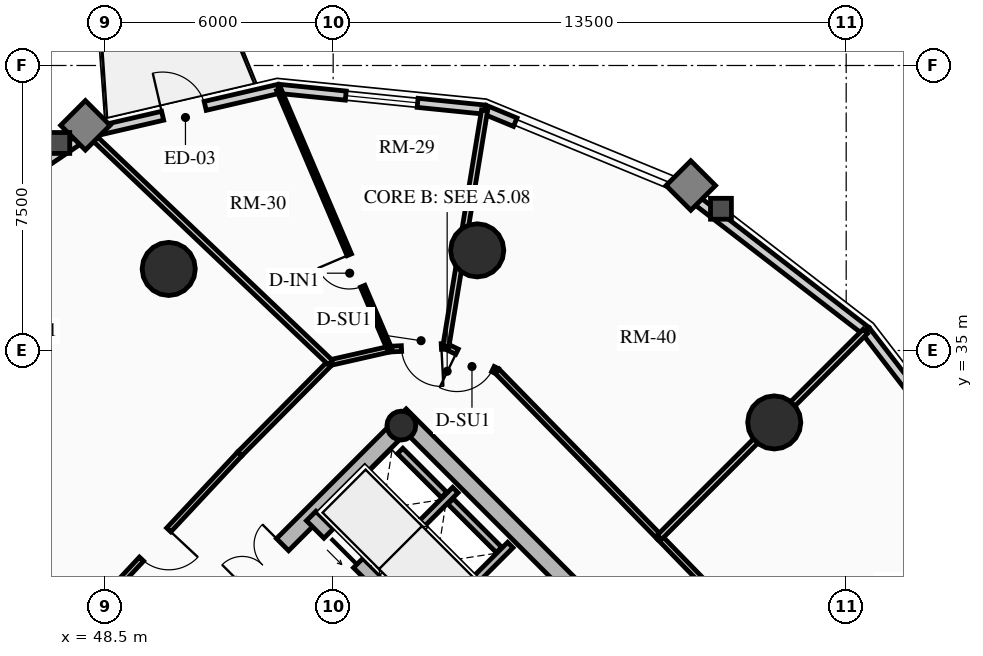
"""IFC4 building model, lengths in metres.
Left out: names, types, materials, properties, quantities, classifications, styles, units other than length and angle.
Written with IfcOpenShell. Run it as: python <this file> out.ifc"""

import sys

from ifc_helpers import new_model, si_unit, direction, frame, frame_2d, origin, origin_2d, place, context, subcontext, project, spatial, rectangle, circle, hollow_circle, extrude, source, transform, mapped, element, fill, save


model = new_model("IFC4")
c1 = context("Model", 3, precision=1e-05, world=origin(), true_north=direction((0.0, 1.0)))
c2 = subcontext(c1, "Body", "Model", "MODEL_VIEW")
j1 = project(units=[si_unit("LENGTHUNIT", "METRE"), si_unit("PLANEANGLEUNIT", "RADIAN")], contexts=[c1])
p1 = place(None, origin())
s1 = spatial("IfcSite", under=j1, at=p1, CompositionType="ELEMENT")
p2 = place(p1, origin())
s2 = spatial("IfcBuilding", under=s1, at=p2, CompositionType="ELEMENT")
p3 = place(p2, frame((0.0, 0.0, 84.7)))
s3 = spatial("IfcBuildingStorey", under=s2, at=p3, CompositionType="ELEMENT", Elevation=84.7)
p4 = place(p3, frame((66.303, 23.263, 0.0), z_axis=(0.0, 0.0, 1.0), x_axis=(-0.707106781187, 0.707106781187, 0.0)))
e1 = element("IfcWall", 1, at=p4, inside=s3, PredefinedType="SHEAR", context=c2, shape_type="SweptSolid", body=[
    extrude(rectangle(XDim=14.2, YDim=0.45, at=frame_2d((7.1, 0.0))), origin(), (0.0, 0.0, 1.0), 2.91),
])
p5 = place(p3, frame((48.856, 25.578, 0.0), z_axis=(0.0, 0.0, 1.0), x_axis=(0.707106781187, 0.707106781187, 0.0)))
e2 = element("IfcWall", 2, at=p5, inside=s3, PredefinedType="SHEAR", context=c2, shape_type="SweptSolid", body=[
    extrude(rectangle(XDim=10.7, YDim=0.45, at=frame_2d((5.35, 0.0))), origin(), (0.0, 0.0, 1.0), 2.91),
])
m1 = source(origin(), c2, "Body", "SweptSolid", [
    extrude(rectangle(XDim=1.5, YDim=2.02, at=frame_2d((0.75, 1.01))), frame((0.0, 0.235, 0.0), z_axis=(0.0, -1.0, 0.0), x_axis=(1.0, 0.0, 0.0)), (0.0, 0.0, 1.0), 0.47),
])
p6 = place(p5, frame((4.6, 0.0, 0.0)))
e3 = element("IfcOpeningElement", 3, at=p6, cuts=e2, PredefinedType="OPENING", context=c2, shape_type="MappedRepresentation", body=[
    mapped(m1, transform((0.0, 0.0, 0.0), x_axis=(1.0, 0.0, 0.0), y_axis=(0.0, 1.0, 0.0), z_axis=(0.0, 0.0, 1.0), scale=1.0)),
])
p7 = place(p3, frame((63.645, 20.922, 0.0), z_axis=(0.0, 0.0, 1.0), x_axis=(-0.707106781187, 0.707106781187, 0.0)))
e4 = element("IfcWall", 4, at=p7, inside=s3, PredefinedType="SHEAR", context=c2, shape_type="SweptSolid", body=[
    extrude(rectangle(XDim=13.75, YDim=0.35, at=frame_2d((6.875, 0.0))), origin(), (0.0, 0.0, 1.0), 2.91),
])
m2 = source(origin(), c2, "Body", "SweptSolid", [
    extrude(rectangle(XDim=1.1, YDim=2.015, at=frame_2d((0.55, 1.007))), frame((0.0, 0.185, 0.0), z_axis=(0.0, -1.0, 0.0), x_axis=(1.0, 0.0, 0.0)), (0.0, 0.0, 1.0), 0.37),
])
p8 = place(p7, frame((10.0, 0.0, 0.0)))
e5 = element("IfcOpeningElement", 5, at=p8, cuts=e4, PredefinedType="OPENING", context=c2, shape_type="MappedRepresentation", body=[
    mapped(m2, transform((0.0, 0.0, 0.0), x_axis=(1.0, 0.0, 0.0), y_axis=(0.0, 1.0, 0.0), z_axis=(0.0, 0.0, 1.0), scale=1.0)),
])
p9 = place(p7, frame((12.0, 0.0, 0.0)))
e6 = element("IfcOpeningElement", 6, at=p9, cuts=e4, PredefinedType="OPENING", context=c2, shape_type="MappedRepresentation", body=[
    mapped(m2, transform((0.0, 0.0, 0.0), x_axis=(1.0, 0.0, 0.0), y_axis=(0.0, 1.0, 0.0), z_axis=(0.0, 0.0, 1.0), scale=1.0)),
])
m3 = source(origin(), c2, "Body", "SweptSolid", [
    extrude(rectangle(XDim=1.15, YDim=2.02, at=frame_2d((0.575, 1.01))), frame((0.0, 0.185, 0.0), z_axis=(0.0, -1.0, 0.0), x_axis=(1.0, 0.0, 0.0)), (0.0, 0.0, 1.0), 0.37),
])
p10 = place(p7, frame((5.305, 0.0, 0.0)))
e7 = element("IfcOpeningElement", 7, at=p10, cuts=e4, PredefinedType="OPENING", context=c2, shape_type="MappedRepresentation", body=[
    mapped(m3, transform((0.0, 0.0, 0.0), x_axis=(1.0, 0.0, 0.0), y_axis=(0.0, 1.0, 0.0), z_axis=(0.0, 0.0, 1.0), scale=1.0)),
])
p11 = place(p3, frame((56.294, 33.024, 0.0), z_axis=(0.0, 0.0, 1.0), x_axis=(0.707106781187, 0.707106781187, 0.0)))
e8 = element("IfcColumn", 8, at=p11, inside=s3, PredefinedType="COLUMN", context=c2, shape_type="SweptSolid", body=[
    extrude(hollow_circle(Radius=0.38, WallThickness=0.032, at=origin_2d()), origin(), (0.0, 0.0, 1.0), 2.91),
])
for number, where, z_axis, x_axis in (
    (9, (66.107, 33.107, 0.0), (0.0, 0.0, 1.0), (1.0, 0.0, 0.0)),
    (10, (58.291, 37.635, 0.0), (0.0, 0.0, 1.0), (1.0, 0.0, 0.0)),
    (11, (50.173, 37.146, 0.0), (0.0, 0.0, 1.0), (1.0, 0.0, 0.0)),
):
    element("IfcColumn", number, at=place(p3, frame(where, z_axis=z_axis, x_axis=x_axis)), inside=s3, PredefinedType="USERDEFINED", context=c2, shape_type="SweptSolid", body=[
        extrude(circle(Radius=0.7, at=origin_2d()), origin(), (0.0, 0.0, 1.0), 2.91),
    ])
p12 = place(p3, frame((63.811, 39.145, 0.0), z_axis=(0.0, 0.0, 1.0), x_axis=(0.791982052206, -0.61054437102, 0.0)))
e12 = element("IfcWall", 12, at=p12, inside=s3, PredefinedType="SOLIDWALL", context=c2, shape_type="SweptSolid", body=[
    extrude(rectangle(XDim=5.942, YDim=0.24, at=frame_2d((2.971, 0.0))), origin(), (0.0, 0.0, 1.0), 2.179),
])
p13 = place(p3, frame((58.487, 41.339, 0.0), z_axis=(0.0, 0.0, 1.0), x_axis=(0.924556017656, -0.381046152345, 0.0)))
e13 = element("IfcWall", 13, at=p13, inside=s3, PredefinedType="SOLIDWALL", context=c2, shape_type="SweptSolid", body=[
    extrude(rectangle(XDim=0.87, YDim=0.24, at=frame_2d((0.435, 0.0))), origin(), (0.0, 0.0, 1.0), 2.179),
])
p14 = place(p3, frame((53.067, 41.885, 0.0), z_axis=(0.0, 0.0, 1.0), x_axis=(0.994971754311, -0.10015591906, 0.0)))
e14 = element("IfcWall", 14, at=p14, inside=s3, PredefinedType="SOLIDWALL", context=c2, shape_type="SweptSolid", body=[
    extrude(rectangle(XDim=5.448, YDim=0.24, at=frame_2d((2.724, 0.0))), origin(), (0.0, 0.0, 1.0), 2.179),
])
m4 = source(origin(), c2, "Body", "SweptSolid", [
    extrude(rectangle(XDim=1.9, YDim=1.35, at=frame_2d((0.95, 0.675))), frame((0.0, 0.13, 0.0), z_axis=(0.0, -1.0, 0.0), x_axis=(1.0, 0.0, 0.0)), (0.0, 0.0, 1.0), 0.26),
])
p15 = place(p14, frame((1.774, 0.0, 0.65)))
e15 = element("IfcOpeningElement", 15, at=p15, cuts=e14, PredefinedType="OPENING", context=c2, shape_type="MappedRepresentation", body=[
    mapped(m4, transform((0.0, 0.0, 0.0), x_axis=(1.0, 0.0, 0.0), y_axis=(0.0, 1.0, 0.0), z_axis=(0.0, 0.0, 1.0), scale=1.0)),
])
p16 = place(p3, frame((48.08, 40.729, 0.0), z_axis=(0.0, 0.0, 1.0), x_axis=(0.974165631126, 0.225834725257, 0.0)))
e16 = element("IfcWall", 16, at=p16, inside=s3, PredefinedType="SOLIDWALL", context=c2, shape_type="SweptSolid", body=[
    extrude(rectangle(XDim=5.119, YDim=0.24, at=frame_2d((2.56, 0.0))), origin(), (0.0, 0.0, 1.0), 2.179),
])
m5 = source(origin(), c2, "Body", "SweptSolid", [
    extrude(rectangle(XDim=1.15, YDim=2.005, at=frame_2d((0.575, 1.002))), frame((0.0, 0.13, 0.0), z_axis=(0.0, -1.0, 0.0), x_axis=(1.0, 0.0, 0.0)), (0.0, 0.0, 1.0), 0.26),
])
p17 = place(p16, frame((1.984, 0.0, 0.0)))
e17 = element("IfcOpeningElement", 17, at=p17, cuts=e16, PredefinedType="OPENING", context=c2, shape_type="MappedRepresentation", body=[
    mapped(m5, transform((0.0, 0.0, 0.0), x_axis=(1.0, 0.0, 0.0), y_axis=(0.0, 1.0, 0.0), z_axis=(0.0, 0.0, 1.0), scale=1.0)),
])
p18 = place(p3, frame((44.015, 37.985, 0.0), z_axis=(0.0, 0.0, 1.0), x_axis=(0.828781148131, 0.559572880421, 0.0)))
e18 = element("IfcWall", 18, at=p18, inside=s3, PredefinedType="SOLIDWALL", context=c2, shape_type="SweptSolid", body=[
    extrude(rectangle(XDim=4.905, YDim=0.24, at=frame_2d((2.452, 0.0))), origin(), (0.0, 0.0, 1.0), 2.179),
])
p19 = place(p3, frame((68.517, 35.517, 0.0), z_axis=(0.0, 0.0, 1.0), x_axis=(0.61054437102, -0.791982052206, 0.0)))
e19 = element("IfcWall", 19, at=p19, inside=s3, PredefinedType="SOLIDWALL", context=c2, shape_type="SweptSolid", body=[
    extrude(rectangle(XDim=5.942, YDim=0.24, at=frame_2d((2.971, 0.0))), origin(), (0.0, 0.0, 1.0), 2.179),
])
m6 = source(origin(), c2, "Body", "SweptSolid", [
    extrude(rectangle(XDim=2.2, YDim=1.35, at=frame_2d((1.1, 0.675))), frame((0.0, 0.13, 0.0), z_axis=(0.0, -1.0, 0.0), x_axis=(1.0, 0.0, 0.0)), (0.0, 0.0, 1.0), 0.26),
])
p20 = place(p19, frame((1.871, 0.0, 0.65)))
e20 = element("IfcOpeningElement", 20, at=p20, cuts=e19, PredefinedType="OPENING", context=c2, shape_type="MappedRepresentation", body=[
    mapped(m6, transform((0.0, 0.0, 0.0), x_axis=(1.0, 0.0, 0.0), y_axis=(0.0, 1.0, 0.0), z_axis=(0.0, 0.0, 1.0), scale=1.0)),
])
p21 = place(p3, frame((57.062, 27.781, 0.0), z_axis=(0.0, 0.0, 1.0), x_axis=(0.707106781187, 0.707106781187, 0.0)))
e21 = element("IfcWall", 21, at=p21, inside=s3, PredefinedType="SHEAR", context=c2, shape_type="SweptSolid", body=[
    extrude(rectangle(XDim=2.97, YDim=0.2, at=frame_2d((1.485, 0.0))), origin(), (0.0, 0.0, 1.0), 2.91),
])
p22 = place(p3, frame((55.615, 29.227, 0.0), z_axis=(0.0, 0.0, 1.0), x_axis=(0.707147878904, 0.70706568108, 0.0)))
e22 = element("IfcWall", 22, at=p22, inside=s3, PredefinedType="SHEAR", context=c2, shape_type="SweptSolid", body=[
    extrude(rectangle(XDim=2.97, YDim=0.2, at=frame_2d((1.485, 0.0))), origin(), (0.0, 0.0, 1.0), 2.91),
])
p23 = place(p3, frame((58.865, 29.754, 0.0), z_axis=(0.0, 0.0, 1.0), x_axis=(-0.707174411312, 0.707039144592, 0.0)))
e23 = element("IfcWall", 23, at=p23, inside=s3, PredefinedType="SHEAR", context=c2, shape_type="SweptSolid", body=[
    extrude(rectangle(XDim=1.805, YDim=0.2, at=frame_2d((0.902, 0.0))), origin(), (0.0, 0.0, 1.0), 2.91),
])
p24 = place(p3, frame((57.419, 31.2, 0.0), z_axis=(0.0, 0.0, 1.0), x_axis=(-0.707032117043, 0.707181437447, 0.0)))
e24 = element("IfcWall", 24, at=p24, inside=s3, PredefinedType="SHEAR", context=c2, shape_type="SweptSolid", body=[
    extrude(rectangle(XDim=1.635, YDim=0.2, at=frame_2d((0.817, 0.0))), origin(), (0.0, 0.0, 1.0), 2.91),
])
p25 = place(p3, frame((63.086, 30.086, 0.0), z_axis=(0.0, 0.0, 1.0), x_axis=(-0.699075897379, 0.715047473741, 0.0)))
e25 = element("IfcWall", 25, at=p25, inside=s3, PredefinedType="PARTITIONING", context=c2, shape_type="SweptSolid", body=[
    extrude(rectangle(XDim=6.114, YDim=0.15, at=frame_2d((3.057, 0.0))), origin(), (0.0, 0.0, 1.0), 2.225),
])
p26 = place(p3, frame((58.812, 34.458, 0.0), z_axis=(0.0, 0.0, 1.0), x_axis=(-0.899559490277, 0.436798264021, 0.0)))
e26 = element("IfcWall", 26, at=p26, inside=s3, PredefinedType="PARTITIONING", context=c2, shape_type="SweptSolid", body=[
    extrude(rectangle(XDim=1.495, YDim=0.15, at=frame_2d((0.748, 0.0))), origin(), (0.0, 0.0, 1.0), 2.225),
])
m7 = source(origin(), c2, "Body", "SweptSolid", [
    extrude(rectangle(XDim=1.05, YDim=2.015, at=frame_2d((0.525, 1.007))), frame((0.0, 0.085, 0.0), z_axis=(0.0, -1.0, 0.0), x_axis=(1.0, 0.0, 0.0)), (0.0, 0.0, 1.0), 0.17),
])
p27 = place(p26, frame((0.12, 0.0, 0.0)))
e27 = element("IfcOpeningElement", 27, at=p27, cuts=e26, PredefinedType="OPENING", context=c2, shape_type="MappedRepresentation", body=[
    mapped(m7, transform((0.0, 0.0, 0.0), x_axis=(1.0, 0.0, 0.0), y_axis=(0.0, 1.0, 0.0), z_axis=(0.0, 0.0, 1.0), scale=1.0)),
])
p28 = place(p3, frame((57.467, 35.111, 0.0), z_axis=(0.0, 0.0, 1.0), x_axis=(-0.998691757323, -0.051134859488, 0.0)))
e28 = element("IfcWall", 28, at=p28, inside=s3, PredefinedType="PARTITIONING", context=c2, shape_type="SweptSolid", body=[
    extrude(rectangle(XDim=1.485, YDim=0.15, at=frame_2d((0.742, 0.0))), origin(), (0.0, 0.0, 1.0), 2.225),
])
p29 = place(p28, frame((0.12, 0.0, 0.0)))
e29 = element("IfcOpeningElement", 29, at=p29, cuts=e28, PredefinedType="OPENING", context=c2, shape_type="MappedRepresentation", body=[
    mapped(m7, transform((0.0, 0.0, 0.0), x_axis=(1.0, 0.0, 0.0), y_axis=(0.0, 1.0, 0.0), z_axis=(0.0, 0.0, 1.0), scale=1.0)),
])
p30 = place(p3, frame((55.984, 35.035, 0.0), z_axis=(0.0, 0.0, 1.0), x_axis=(-0.975290305708, -0.22092718165, 0.0)))
e30 = element("IfcWall", 30, at=p30, inside=s3, PredefinedType="PARTITIONING", context=c2, shape_type="SweptSolid", body=[
    extrude(rectangle(XDim=1.597, YDim=0.15, at=frame_2d((0.798, 0.0))), origin(), (0.0, 0.0, 1.0), 2.225),
])
p31 = place(p3, frame((54.427, 34.683, 0.0), z_axis=(0.0, 0.0, 1.0), x_axis=(-0.704178989986, -0.710022499687, 0.0)))
e31 = element("IfcWall", 31, at=p31, inside=s3, PredefinedType="PARTITIONING", context=c2, shape_type="SweptSolid", body=[
    extrude(rectangle(XDim=3.384, YDim=0.15, at=frame_2d((1.692, 0.0))), origin(), (0.0, 0.0, 1.0), 2.225),
])
p32 = place(p3, frame((52.043, 32.28, 0.0), z_axis=(0.0, 0.0, 1.0), x_axis=(-0.682606081633, -0.730786519661, 0.0)))
e32 = element("IfcWall", 32, at=p32, inside=s3, PredefinedType="PARTITIONING", context=c2, shape_type="SweptSolid", body=[
    extrude(rectangle(XDim=6.527, YDim=0.15, at=frame_2d((3.263, 0.0))), origin(), (0.0, 0.0, 1.0), 2.225),
])
p33 = place(p32, frame((2.738, 0.0, 0.0)))
e33 = element("IfcOpeningElement", 33, at=p33, cuts=e32, PredefinedType="OPENING", context=c2, shape_type="MappedRepresentation", body=[
    mapped(m7, transform((0.0, 0.0, 0.0), x_axis=(1.0, 0.0, 0.0), y_axis=(0.0, 1.0, 0.0), z_axis=(0.0, 0.0, 1.0), scale=1.0)),
])
p34 = place(p3, frame((67.27, 25.78, 0.0), z_axis=(0.0, 0.0, 1.0), x_axis=(-0.696847842907, 0.717218992942, 0.0)))
e34 = element("IfcWall", 34, at=p34, inside=s3, PredefinedType="PARTITIONING", context=c2, shape_type="SweptSolid", body=[
    extrude(rectangle(XDim=6.004, YDim=0.15, at=frame_2d((3.002, 0.0))), origin(), (0.0, 0.0, 1.0), 2.655),
])
m8 = source(origin(), c2, "Body", "SweptSolid", [
    extrude(rectangle(XDim=1.0, YDim=2.015, at=frame_2d((0.5, 1.007))), frame((0.0, 0.085, 0.0), z_axis=(0.0, -1.0, 0.0), x_axis=(1.0, 0.0, 0.0)), (0.0, 0.0, 1.0), 0.17),
])
p35 = place(p34, frame((2.502, 0.0, 0.0)))
e35 = element("IfcOpeningElement", 35, at=p35, cuts=e34, PredefinedType="OPENING", context=c2, shape_type="MappedRepresentation", body=[
    mapped(m8, transform((0.0, 0.0, 0.0), x_axis=(1.0, 0.0, 0.0), y_axis=(0.0, 1.0, 0.0), z_axis=(0.0, 0.0, 1.0), scale=1.0)),
])
p36 = place(p3, frame((63.086, 30.086, 0.0), z_axis=(0.0, 0.0, 1.0), x_axis=(0.707106781187, 0.707106781187, 0.0)))
e36 = element("IfcWall", 36, at=p36, inside=s3, PredefinedType="PARTITIONING", context=c2, shape_type="SweptSolid", body=[
    extrude(rectangle(XDim=7.661, YDim=0.16, at=frame_2d((3.831, 0.0))), origin(), (0.0, 0.0, 1.0), 2.179),
])
p37 = place(p3, frame((57.467, 35.111, 0.0), z_axis=(0.0, 0.0, 1.0), x_axis=(0.161711214096, 0.98683812413, 0.0)))
e37 = element("IfcWall", 37, at=p37, inside=s3, PredefinedType="PARTITIONING", context=c2, shape_type="SweptSolid", body=[
    extrude(rectangle(XDim=6.291, YDim=0.16, at=frame_2d((3.146, 0.0))), origin(), (0.0, 0.0, 1.0), 2.179),
])
p38 = place(p3, frame((54.427, 34.683, 0.0), z_axis=(0.0, 0.0, 1.0), x_axis=(-0.72454072322, 0.689231993161, 0.0)))
e38 = element("IfcWall", 38, at=p38, inside=s3, PredefinedType="PARTITIONING", context=c2, shape_type="SweptSolid", body=[
    extrude(rectangle(XDim=8.747, YDim=0.16, at=frame_2d((4.374, 0.0))), origin(), (0.0, 0.0, 1.0), 2.179),
])
p39 = place(p3, frame((47.588, 27.51, 0.0), z_axis=(0.0, 0.0, 1.0), x_axis=(-0.701457073903, 0.712711704318, 0.0)))
e39 = element("IfcWall", 39, at=p39, inside=s3, PredefinedType="PARTITIONING", context=c2, shape_type="SweptSolid", body=[
    extrude(rectangle(XDim=8.981, YDim=0.16, at=frame_2d((4.49, 0.0))), origin(), (0.0, 0.0, 1.0), 2.179),
])
p40 = place(p3, frame((55.984, 35.035, 0.0), z_axis=(0.0, 0.0, 1.0), x_axis=(-0.392438685048, 0.919778168081, 0.0)))
e40 = element("IfcWall", 40, at=p40, inside=s3, PredefinedType="PARTITIONING", context=c2, shape_type="SweptSolid", body=[
    extrude(rectangle(XDim=7.426, YDim=0.125, at=frame_2d((3.713, 0.0))), origin(), (0.0, 0.0, 1.0), 2.179),
])
m9 = source(origin(), c2, "Body", "SweptSolid", [
    extrude(rectangle(XDim=0.9, YDim=2.005, at=frame_2d((0.45, 1.002))), frame((0.0, 0.073, 0.0), z_axis=(0.0, -1.0, 0.0), x_axis=(1.0, 0.0, 0.0)), (0.0, 0.0, 1.0), 0.145),
])
p41 = place(p40, frame((1.8, 0.0, 0.0)))
e41 = element("IfcOpeningElement", 41, at=p41, cuts=e40, PredefinedType="OPENING", context=c2, shape_type="MappedRepresentation", body=[
    mapped(m9, transform((0.0, 0.0, 0.0), x_axis=(1.0, 0.0, 0.0), y_axis=(0.0, 1.0, 0.0), z_axis=(0.0, 0.0, 1.0), scale=1.0)),
])
m10 = source(origin(), c2, "Body", "SweptSolid", [
    extrude(rectangle(XDim=1.9, YDim=1.35, at=frame_2d((0.95, 0.675))), frame((0.0, 0.03, 0.0), z_axis=(0.0, -1.0, 0.0), x_axis=(1.0, 0.0, 0.0)), (0.0, 0.0, 1.0), 0.06),
])
p42 = place(p15, origin())
e42 = element("IfcWindow", 42, at=p42, inside=s3, PartitioningType="DOUBLE_PANEL_VERTICAL", PredefinedType="WINDOW", context=c2, shape_type="MappedRepresentation", body=[
    mapped(m10, transform((0.0, 0.0, 0.0), x_axis=(1.0, 0.0, 0.0), y_axis=(0.0, 1.0, 0.0), z_axis=(0.0, 0.0, 1.0), scale=1.0)),
])
fill(e15, e42)
m11 = source(origin(), c2, "Body", "SweptSolid", [
    extrude(rectangle(XDim=1.15, YDim=2.005, at=frame_2d((0.575, 1.002))), frame((0.0, 0.025, 0.0), z_axis=(0.0, -1.0, 0.0), x_axis=(1.0, 0.0, 0.0)), (0.0, 0.0, 1.0), 0.05),
])
p43 = place(p17, origin())
e43 = element("IfcDoor", 43, at=p43, inside=s3, OperationType="SINGLE_SWING_LEFT", PredefinedType="DOOR", context=c2, shape_type="MappedRepresentation", body=[
    mapped(m11, transform((0.0, 0.0, 0.0), x_axis=(1.0, 0.0, 0.0), y_axis=(0.0, 1.0, 0.0), z_axis=(0.0, 0.0, 1.0), scale=1.0)),
])
fill(e17, e43)
m12 = source(origin(), c2, "Body", "SweptSolid", [
    extrude(rectangle(XDim=1.1, YDim=2.015, at=frame_2d((0.55, 1.007))), frame((0.0, 0.025, 0.0), z_axis=(0.0, -1.0, 0.0), x_axis=(1.0, 0.0, 0.0)), (0.0, 0.0, 1.0), 0.05),
])
p44 = place(p9, origin())
e44 = element("IfcDoor", 44, at=p44, inside=s3, OperationType="SLIDING_TO_LEFT", PredefinedType="DOOR", context=c2, shape_type="MappedRepresentation", body=[
    mapped(m12, transform((0.0, 0.0, 0.0), x_axis=(1.0, 0.0, 0.0), y_axis=(0.0, 1.0, 0.0), z_axis=(0.0, 0.0, 1.0), scale=1.0)),
])
fill(e6, e44)
m13 = source(origin(), c2, "Body", "SweptSolid", [
    extrude(rectangle(XDim=1.5, YDim=2.02, at=frame_2d((0.75, 1.01))), frame((0.0, 0.025, 0.0), z_axis=(0.0, -1.0, 0.0), x_axis=(1.0, 0.0, 0.0)), (0.0, 0.0, 1.0), 0.05),
])
p45 = place(p6, origin())
e45 = element("IfcDoor", 45, at=p45, inside=s3, OperationType="DOUBLE_DOOR_SINGLE_SWING", PredefinedType="DOOR", context=c2, shape_type="MappedRepresentation", body=[
    mapped(m13, transform((0.0, 0.0, 0.0), x_axis=(1.0, 0.0, 0.0), y_axis=(0.0, 1.0, 0.0), z_axis=(0.0, 0.0, 1.0), scale=1.0)),
])
fill(e3, e45)
m14 = source(origin(), c2, "Body", "SweptSolid", [
    extrude(rectangle(XDim=1.05, YDim=2.015, at=frame_2d((0.525, 1.007))), frame((0.0, 0.025, 0.0), z_axis=(0.0, -1.0, 0.0), x_axis=(1.0, 0.0, 0.0)), (0.0, 0.0, 1.0), 0.05),
])
p46 = place(p29, origin())
e46 = element("IfcDoor", 46, at=p46, inside=s3, OperationType="SINGLE_SWING_LEFT", PredefinedType="DOOR", context=c2, shape_type="MappedRepresentation", body=[
    mapped(m14, transform((0.0, 0.0, 0.0), x_axis=(1.0, 0.0, 0.0), y_axis=(0.0, 1.0, 0.0), z_axis=(0.0, 0.0, 1.0), scale=1.0)),
])
fill(e29, e46)
m15 = source(origin(), c2, "Body", "SweptSolid", [
    extrude(rectangle(XDim=0.9, YDim=2.005, at=frame_2d((0.45, 1.002))), frame((0.0, 0.025, 0.0), z_axis=(0.0, -1.0, 0.0), x_axis=(1.0, 0.0, 0.0)), (0.0, 0.0, 1.0), 0.05),
])
p47 = place(p41, origin())
e47 = element("IfcDoor", 47, at=p47, inside=s3, OperationType="SINGLE_SWING_RIGHT", PredefinedType="DOOR", context=c2, shape_type="MappedRepresentation", body=[
    mapped(m15, transform((0.0, 0.0, 0.0), x_axis=(1.0, 0.0, 0.0), y_axis=(0.0, 1.0, 0.0), z_axis=(0.0, 0.0, 1.0), scale=1.0)),
])
fill(e41, e47)
p48 = place(p33, origin())
e48 = element("IfcDoor", 48, at=p48, inside=s3, OperationType="SINGLE_SWING_LEFT", PredefinedType="DOOR", context=c2, shape_type="MappedRepresentation", body=[
    mapped(m14, transform((0.0, 0.0, 0.0), x_axis=(1.0, 0.0, 0.0), y_axis=(0.0, 1.0, 0.0), z_axis=(0.0, 0.0, 1.0), scale=1.0)),
])
fill(e33, e48)
p49 = place(p27, origin())
e49 = element("IfcDoor", 49, at=p49, inside=s3, OperationType="SINGLE_SWING_RIGHT", PredefinedType="DOOR", context=c2, shape_type="MappedRepresentation", body=[
    mapped(m14, transform((0.0, 0.0, 0.0), x_axis=(1.0, 0.0, 0.0), y_axis=(0.0, 1.0, 0.0), z_axis=(0.0, 0.0, 1.0), scale=1.0)),
])
fill(e27, e49)
save(model, sys.argv[1])
